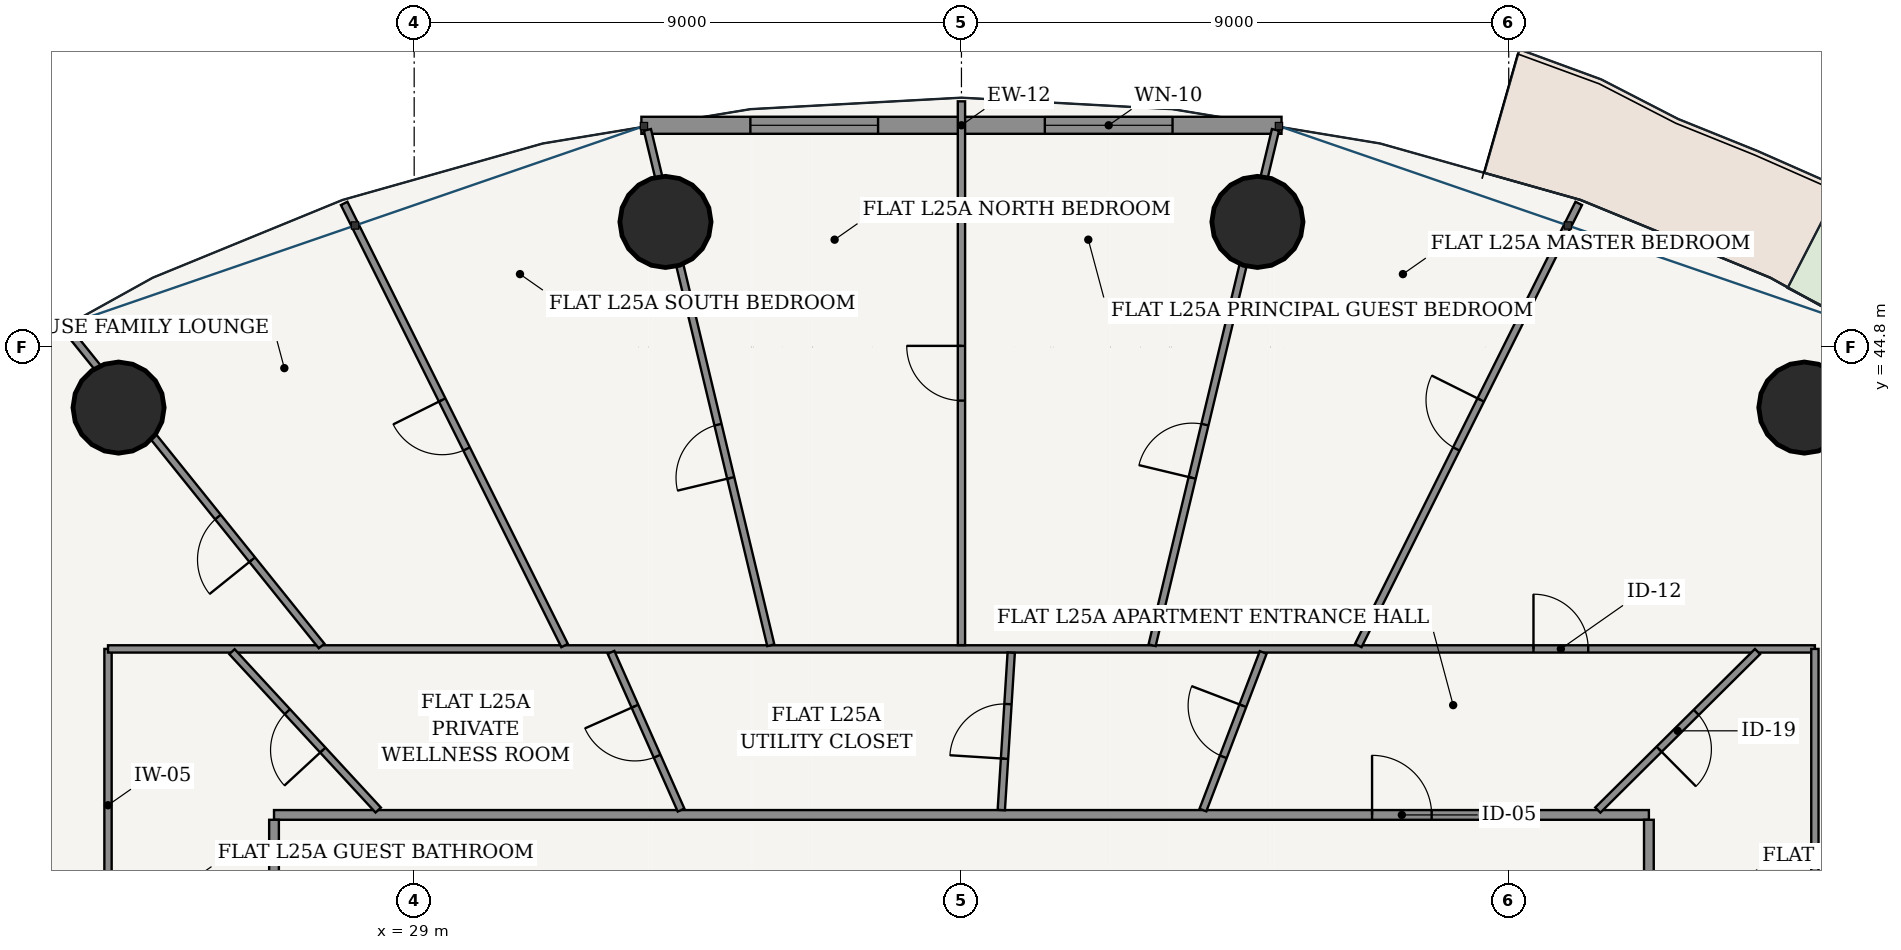
"""IFC4 building model, lengths in metres.
Left out: names, types, materials, properties, quantities, classifications, styles, units other than length and angle.
Written with IfcOpenShell. Run it as: python <this file> out.ifc"""

import sys

from ifc_helpers import new_model, si_unit, direction, frame, frame_2d, origin, origin_2d, place, context, subcontext, project, spatial, rectangle, hollow_circle, extrude, source, transform, mapped, element, fill, save


model = new_model("IFC4")
c1 = context("Model", 3, precision=1e-05, world=origin(), true_north=direction((-0.2419218956, 0.970295726276)))
c2 = subcontext(c1, "Body", "Model", "MODEL_VIEW")
j1 = project(units=[si_unit("LENGTHUNIT", "METRE"), si_unit("PLANEANGLEUNIT", "RADIAN")], contexts=[c1])
p1 = place(None, origin())
s1 = spatial("IfcSite", under=j1, at=p1, CompositionType="ELEMENT")
p2 = place(p1, origin())
s2 = spatial("IfcBuilding", under=s1, at=p2, CompositionType="ELEMENT")
p3 = place(p2, frame((0.0, 0.0, 97.8)))
s3 = spatial("IfcBuildingStorey", under=s2, at=p3, CompositionType="ELEMENT", Elevation=97.8)
for number, where, z_axis, x_axis in (
    (1, (51.862, 43.803, 0.0), (0.0, 0.0, 1.0), (1.0, 0.0, 0.0)),
    (2, (42.867, 46.857, 0.0), (0.0, 0.0, 1.0), (1.0, 0.0, 0.0)),
    (3, (33.133, 46.857, 0.0), (0.0, 0.0, 1.0), (1.0, 0.0, 0.0)),
    (4, (24.138, 43.803, 0.0), (0.0, 0.0, 1.0), (1.0, 0.0, 0.0)),
):
    element("IfcColumn", number, at=place(p3, frame(where, z_axis=z_axis, x_axis=x_axis)), inside=s3, PredefinedType="COLUMN", context=c2, shape_type="SweptSolid", body=[
        extrude(hollow_circle(Radius=0.75, WallThickness=0.045, at=origin_2d()), origin(), (0.0, 0.0, 1.0), 3.6),
    ])
p4 = place(p3, frame((43.264, 48.446, 0.0), z_axis=(0.0, 0.0, 1.0), x_axis=(-1.0, 0.0, 0.0)))
e5 = element("IfcWall", 5, at=p4, inside=s3, PredefinedType="SOLIDWALL", context=c2, shape_type="SweptSolid", body=[
    extrude(rectangle(XDim=10.527, YDim=0.28, at=frame_2d((5.264, 0.0))), origin(), (0.0, 0.0, 1.0), 3.325),
])
p5 = place(p4, frame((1.792, 0.0, 0.85)))
e6 = element("IfcOpeningElement", 6, at=p5, cuts=e5, PredefinedType="OPENING", context=c2, shape_type="SweptSolid", body=[
    extrude(rectangle(XDim=2.1, YDim=1.95, at=frame_2d((1.05, 0.975))), frame((0.0, 0.15, 0.0), z_axis=(0.0, -1.0, 0.0), x_axis=(1.0, 0.0, 0.0)), (0.0, 0.0, 1.0), 0.3),
])
p6 = place(p4, frame((6.635, 0.0, 0.85)))
e7 = element("IfcOpeningElement", 7, at=p6, cuts=e5, PredefinedType="OPENING", context=c2, shape_type="SweptSolid", body=[
    extrude(rectangle(XDim=2.1, YDim=1.95, at=frame_2d((1.05, 0.975))), frame((0.0, 0.15, 0.0), z_axis=(0.0, -1.0, 0.0), x_axis=(1.0, 0.0, 0.0)), (0.0, 0.0, 1.0), 0.3),
])
p7 = place(p3, frame((26.695, 37.105, 0.0), z_axis=(0.0, 0.0, 1.0), x_axis=(1.0, 0.0, 0.0)))
e8 = element("IfcWall", 8, at=p7, inside=s3, PredefinedType="PARTITIONING", context=c2, shape_type="SweptSolid", body=[
    extrude(rectangle(XDim=22.61, YDim=0.16, at=frame_2d((11.305, 0.0))), origin(), (0.0, 0.0, 1.0), 2.767),
])
p8 = place(p7, frame((18.058, 0.0, 0.0)))
e9 = element("IfcOpeningElement", 9, at=p8, cuts=e8, PredefinedType="OPENING", context=c2, shape_type="SweptSolid", body=[
    extrude(rectangle(XDim=0.98, YDim=2.2, at=frame_2d((0.49, 1.1))), frame((0.0, 0.09, 0.0), z_axis=(0.0, -1.0, 0.0), x_axis=(1.0, 0.0, 0.0)), (0.0, 0.0, 1.0), 0.18),
])
for number, where, z_axis, x_axis in (
    (10, (26.695, 16.575, 0.0), (0.0, 0.0, 1.0), (0.0, 1.0, 0.0)),
    (11, (49.305, 16.575, 0.0), (0.0, 0.0, 1.0), (0.0, 1.0, 0.0)),
):
    element("IfcWall", number, at=place(p3, frame(where, z_axis=z_axis, x_axis=x_axis)), inside=s3, PredefinedType="PARTITIONING", context=c2, shape_type="SweptSolid", body=[
        extrude(rectangle(XDim=20.45, YDim=0.16, at=frame_2d((10.225, 0.0))), origin(), (0.0, 0.0, 1.0), 2.767),
    ])
p9 = place(p3, frame((49.387, 33.121, 0.0), z_axis=(0.0, 0.0, 1.0), x_axis=(0.874320165728, 0.485349613992, 0.0)))
e12 = element("IfcWall", 12, at=p9, inside=s3, PredefinedType="PARTITIONING", context=c2, shape_type="SweptSolid", body=[
    extrude(rectangle(XDim=12.156, YDim=0.2, at=frame_2d((6.078, 0.0))), origin(), (0.0, 0.0, 1.0), 2.767),
])
p10 = place(p3, frame((23.965, 34.693, 0.0), z_axis=(0.0, 0.0, 1.0), x_axis=(0.0, 1.0, 0.0)))
e13 = element("IfcWall", 13, at=p10, inside=s3, PredefinedType="PARTITIONING", context=c2, shape_type="SweptSolid", body=[
    extrude(rectangle(XDim=5.142, YDim=0.12, at=frame_2d((2.571, 0.0))), origin(), (0.0, 0.0, 1.0), 3.004),
])
p11 = place(p3, frame((23.965, 39.835, 0.0), z_axis=(0.0, 0.0, 1.0), x_axis=(1.0, 0.0, 0.0)))
e14 = element("IfcWall", 14, at=p11, inside=s3, PredefinedType="PARTITIONING", context=c2, shape_type="SweptSolid", body=[
    extrude(rectangle(XDim=28.07, YDim=0.12, at=frame_2d((14.035, 0.0))), origin(), (0.0, 0.0, 1.0), 2.767),
])
p12 = place(p11, frame((23.442, 0.0, 0.0)))
e15 = element("IfcOpeningElement", 15, at=p12, cuts=e14, PredefinedType="OPENING", context=c2, shape_type="SweptSolid", body=[
    extrude(rectangle(XDim=0.9, YDim=2.15, at=frame_2d((0.45, 1.075))), frame((0.0, 0.07, 0.0), z_axis=(0.0, -1.0, 0.0), x_axis=(1.0, 0.0, 0.0)), (0.0, 0.0, 1.0), 0.14),
])
p13 = place(p3, frame((52.035, 39.835, 0.0), z_axis=(0.0, 0.0, 1.0), x_axis=(0.0, -1.0, 0.0)))
e16 = element("IfcWall", 16, at=p13, inside=s3, PredefinedType="PARTITIONING", context=c2, shape_type="SweptSolid", body=[
    extrude(rectangle(XDim=5.142, YDim=0.12, at=frame_2d((2.571, 0.0))), origin(), (0.0, 0.0, 1.0), 3.004),
])
p14 = place(p3, frame((44.526, 39.89, 0.0), z_axis=(0.0, 0.0, 1.0), x_axis=(0.446167584581, 0.894949432353, 0.0)))
e17 = element("IfcWall", 17, at=p14, inside=s3, PredefinedType="PARTITIONING", context=c2, shape_type="SweptSolid", body=[
    extrude(rectangle(XDim=8.125, YDim=0.12, at=frame_2d((4.062, 0.0))), origin(), (0.0, 0.0, 1.0), 2.767),
])
p15 = place(p14, frame((3.612, 0.0, 0.0)))
e18 = element("IfcOpeningElement", 18, at=p15, cuts=e17, PredefinedType="OPENING", context=c2, shape_type="SweptSolid", body=[
    extrude(rectangle(XDim=0.9, YDim=2.15, at=frame_2d((0.45, 1.075))), frame((0.0, 0.07, 0.0), z_axis=(0.0, -1.0, 0.0), x_axis=(1.0, 0.0, 0.0)), (0.0, 0.0, 1.0), 0.14),
])
p16 = place(p3, frame((41.135, 39.895, 0.0), z_axis=(0.0, 0.0, 1.0), x_axis=(0.23282725047, 0.97251810854, 0.0)))
e19 = element("IfcWall", 19, at=p16, inside=s3, PredefinedType="PARTITIONING", context=c2, shape_type="SweptSolid", body=[
    extrude(rectangle(XDim=8.715, YDim=0.12, at=frame_2d((4.357, 0.0))), origin(), (0.0, 0.0, 1.0), 2.767),
])
p17 = place(p16, frame((2.831, 0.0, 0.0)))
e20 = element("IfcOpeningElement", 20, at=p17, cuts=e19, PredefinedType="OPENING", context=c2, shape_type="SweptSolid", body=[
    extrude(rectangle(XDim=0.9, YDim=2.15, at=frame_2d((0.45, 1.075))), frame((0.0, 0.07, 0.0), z_axis=(0.0, -1.0, 0.0), x_axis=(1.0, 0.0, 0.0)), (0.0, 0.0, 1.0), 0.14),
])
p18 = place(p3, frame((38.0, 39.897, 0.0), z_axis=(0.0, 0.0, 1.0), x_axis=(0.0, 1.0, 0.0)))
e21 = element("IfcWall", 21, at=p18, inside=s3, PredefinedType="PARTITIONING", context=c2, shape_type="SweptSolid", body=[
    extrude(rectangle(XDim=8.943, YDim=0.12, at=frame_2d((4.472, 0.0))), origin(), (0.0, 0.0, 1.0), 2.767),
])
p19 = place(p18, frame((4.021, 0.0, 0.0)))
e22 = element("IfcOpeningElement", 22, at=p19, cuts=e21, PredefinedType="OPENING", context=c2, shape_type="SweptSolid", body=[
    extrude(rectangle(XDim=0.9, YDim=2.15, at=frame_2d((0.45, 1.075))), frame((0.0, 0.07, 0.0), z_axis=(0.0, -1.0, 0.0), x_axis=(1.0, 0.0, 0.0)), (0.0, 0.0, 1.0), 0.14),
])
p20 = place(p3, frame((34.865, 39.895, 0.0), z_axis=(0.0, 0.0, 1.0), x_axis=(-0.23282725047, 0.97251810854, 0.0)))
e23 = element("IfcWall", 23, at=p20, inside=s3, PredefinedType="PARTITIONING", context=c2, shape_type="SweptSolid", body=[
    extrude(rectangle(XDim=8.715, YDim=0.12, at=frame_2d((4.357, 0.0))), origin(), (0.0, 0.0, 1.0), 2.767),
])
p21 = place(p20, frame((2.83, 0.0, 0.0)))
e24 = element("IfcOpeningElement", 24, at=p21, cuts=e23, PredefinedType="OPENING", context=c2, shape_type="SweptSolid", body=[
    extrude(rectangle(XDim=0.9, YDim=2.15, at=frame_2d((0.45, 1.075))), frame((0.0, 0.07, 0.0), z_axis=(0.0, -1.0, 0.0), x_axis=(1.0, 0.0, 0.0)), (0.0, 0.0, 1.0), 0.14),
])
p22 = place(p3, frame((31.474, 39.89, 0.0), z_axis=(0.0, 0.0, 1.0), x_axis=(-0.446167584581, 0.894949432353, 0.0)))
e25 = element("IfcWall", 25, at=p22, inside=s3, PredefinedType="PARTITIONING", context=c2, shape_type="SweptSolid", body=[
    extrude(rectangle(XDim=8.125, YDim=0.12, at=frame_2d((4.062, 0.0))), origin(), (0.0, 0.0, 1.0), 2.767),
])
p23 = place(p22, frame((3.612, 0.0, 0.0)))
e26 = element("IfcOpeningElement", 26, at=p23, cuts=e25, PredefinedType="OPENING", context=c2, shape_type="SweptSolid", body=[
    extrude(rectangle(XDim=0.9, YDim=2.15, at=frame_2d((0.45, 1.075))), frame((0.0, 0.07, 0.0), z_axis=(0.0, -1.0, 0.0), x_axis=(1.0, 0.0, 0.0)), (0.0, 0.0, 1.0), 0.14),
])
p24 = place(p3, frame((27.478, 39.883, 0.0), z_axis=(0.0, 0.0, 1.0), x_axis=(-0.62672583251, 0.779239841682, 0.0)))
e27 = element("IfcWall", 27, at=p24, inside=s3, PredefinedType="PARTITIONING", context=c2, shape_type="SweptSolid", body=[
    extrude(rectangle(XDim=6.678, YDim=0.12, at=frame_2d((3.339, 0.0))), origin(), (0.0, 0.0, 1.0), 2.767),
])
p25 = place(p24, frame((1.821, 0.0, 0.0)))
e28 = element("IfcOpeningElement", 28, at=p25, cuts=e27, PredefinedType="OPENING", context=c2, shape_type="SweptSolid", body=[
    extrude(rectangle(XDim=0.9, YDim=2.15, at=frame_2d((0.45, 1.075))), frame((0.0, 0.07, 0.0), z_axis=(0.0, -1.0, 0.0), x_axis=(1.0, 0.0, 0.0)), (0.0, 0.0, 1.0), 0.14),
])
p26 = place(p3, frame((48.465, 37.185, 0.0), z_axis=(0.0, 0.0, 1.0), x_axis=(0.709839752998, 0.704363205359, 0.0)))
e29 = element("IfcWall", 29, at=p26, inside=s3, PredefinedType="PARTITIONING", context=c2, shape_type="SweptSolid", body=[
    extrude(rectangle(XDim=3.7, YDim=0.12, at=frame_2d((1.85, 0.0))), origin(), (0.0, 0.0, 1.0), 2.767),
])
p27 = place(p26, frame((1.42, 0.0, 0.0)))
e30 = element("IfcOpeningElement", 30, at=p27, cuts=e29, PredefinedType="OPENING", context=c2, shape_type="SweptSolid", body=[
    extrude(rectangle(XDim=0.86, YDim=2.15, at=frame_2d((0.43, 1.075))), frame((0.0, 0.07, 0.0), z_axis=(0.0, -1.0, 0.0), x_axis=(1.0, 0.0, 0.0)), (0.0, 0.0, 1.0), 0.14),
])
p28 = place(p3, frame((41.971, 37.185, 0.0), z_axis=(0.0, 0.0, 1.0), x_axis=(0.357180358075, 0.934035433913, 0.0)))
e31 = element("IfcWall", 31, at=p28, inside=s3, PredefinedType="PARTITIONING", context=c2, shape_type="SweptSolid", body=[
    extrude(rectangle(XDim=2.775, YDim=0.12, at=frame_2d((1.388, 0.0))), origin(), (0.0, 0.0, 1.0), 3.325),
])
p29 = place(p28, frame((0.938, 0.0, 0.0)))
e32 = element("IfcOpeningElement", 32, at=p29, cuts=e31, PredefinedType="OPENING", context=c2, shape_type="SweptSolid", body=[
    extrude(rectangle(XDim=0.9, YDim=2.15, at=frame_2d((0.45, 1.075))), frame((0.0, 0.07, 0.0), z_axis=(0.0, -1.0, 0.0), x_axis=(1.0, 0.0, 0.0)), (0.0, 0.0, 1.0), 0.14),
])
p30 = place(p3, frame((38.655, 37.185, 0.0), z_axis=(0.0, 0.0, 1.0), x_axis=(0.062981965009, 0.998014665265, 0.0)))
e33 = element("IfcWall", 33, at=p30, inside=s3, PredefinedType="PARTITIONING", context=c2, shape_type="SweptSolid", body=[
    extrude(rectangle(XDim=2.593, YDim=0.12, at=frame_2d((1.297, 0.0))), origin(), (0.0, 0.0, 1.0), 3.325),
])
p31 = place(p30, frame((0.847, 0.0, 0.0)))
e34 = element("IfcOpeningElement", 34, at=p31, cuts=e33, PredefinedType="OPENING", context=c2, shape_type="SweptSolid", body=[
    extrude(rectangle(XDim=0.9, YDim=2.15, at=frame_2d((0.45, 1.075))), frame((0.0, 0.07, 0.0), z_axis=(0.0, -1.0, 0.0), x_axis=(1.0, 0.0, 0.0)), (0.0, 0.0, 1.0), 0.14),
])
p32 = place(p3, frame((33.389, 37.185, 0.0), z_axis=(0.0, 0.0, 1.0), x_axis=(-0.40585903307, 0.913935689902, 0.0)))
e35 = element("IfcWall", 35, at=p32, inside=s3, PredefinedType="PARTITIONING", context=c2, shape_type="SweptSolid", body=[
    extrude(rectangle(XDim=2.837, YDim=0.12, at=frame_2d((1.419, 0.0))), origin(), (0.0, 0.0, 1.0), 3.325),
])
p33 = place(p32, frame((0.969, 0.0, 0.0)))
e36 = element("IfcOpeningElement", 36, at=p33, cuts=e35, PredefinedType="OPENING", context=c2, shape_type="SweptSolid", body=[
    extrude(rectangle(XDim=0.9, YDim=2.15, at=frame_2d((0.45, 1.075))), frame((0.0, 0.07, 0.0), z_axis=(0.0, -1.0, 0.0), x_axis=(1.0, 0.0, 0.0)), (0.0, 0.0, 1.0), 0.14),
])
p34 = place(p3, frame((28.409, 37.185, 0.0), z_axis=(0.0, 0.0, 1.0), x_axis=(-0.678451695105, 0.734645014554, 0.0)))
e37 = element("IfcWall", 37, at=p34, inside=s3, PredefinedType="PARTITIONING", context=c2, shape_type="SweptSolid", body=[
    extrude(rectangle(XDim=3.545, YDim=0.12, at=frame_2d((1.772, 0.0))), origin(), (0.0, 0.0, 1.0), 2.767),
])
p35 = place(p34, frame((1.343, 0.0, 0.0)))
e38 = element("IfcOpeningElement", 38, at=p35, cuts=e37, PredefinedType="OPENING", context=c2, shape_type="SweptSolid", body=[
    extrude(rectangle(XDim=0.86, YDim=2.15, at=frame_2d((0.43, 1.075))), frame((0.0, 0.07, 0.0), z_axis=(0.0, -1.0, 0.0), x_axis=(1.0, 0.0, 0.0)), (0.0, 0.0, 1.0), 0.14),
])
p36 = place(p3, frame((26.615, 33.12, 0.0), z_axis=(0.0, 0.0, 1.0), x_axis=(-0.874319192772, 0.485351366692, 0.0)))
e39 = element("IfcWall", 39, at=p36, inside=s3, PredefinedType="PARTITIONING", context=c2, shape_type="SweptSolid", body=[
    extrude(rectangle(XDim=12.158, YDim=0.2, at=frame_2d((6.079, 0.0))), origin(), (0.0, 0.0, 1.0), 2.767),
])
m1 = source(origin(), c2, "Body", "SweptSolid", [
    extrude(rectangle(XDim=2.1, YDim=1.95, at=frame_2d((1.05, 0.975))), frame((0.0, 0.03, 0.0), z_axis=(0.0, -1.0, 0.0), x_axis=(1.0, 0.0, 0.0)), (0.0, 0.0, 1.0), 0.06),
])
p37 = place(p5, origin())
e40 = element("IfcWindow", 40, at=p37, inside=s3, PartitioningType="SINGLE_PANEL", PredefinedType="WINDOW", context=c2, shape_type="MappedRepresentation", body=[
    mapped(m1, transform((0.0, 0.0, 0.0), scale=1.0)),
])
fill(e6, e40)
p38 = place(p6, origin())
e41 = element("IfcWindow", 41, at=p38, inside=s3, PartitioningType="SINGLE_PANEL", PredefinedType="WINDOW", context=c2, shape_type="MappedRepresentation", body=[
    mapped(m1, transform((0.0, 0.0, 0.0), scale=1.0)),
])
fill(e7, e41)
m2 = source(origin(), c2, "Body", "SweptSolid", [
    extrude(rectangle(XDim=0.98, YDim=2.2, at=frame_2d((0.49, 1.1))), frame((0.0, 0.025, 0.0), z_axis=(0.0, -1.0, 0.0), x_axis=(1.0, 0.0, 0.0)), (0.0, 0.0, 1.0), 0.05),
])
p39 = place(p8, origin())
e42 = element("IfcDoor", 42, at=p39, inside=s3, OperationType="SINGLE_SWING_LEFT", PredefinedType="DOOR", context=c2, shape_type="MappedRepresentation", body=[
    mapped(m2, transform((0.0, 0.0, 0.0), scale=1.0)),
])
fill(e9, e42)
m3 = source(origin(), c2, "Body", "SweptSolid", [
    extrude(rectangle(XDim=0.86, YDim=2.15, at=frame_2d((0.43, 1.075))), frame((0.0, 0.025, 0.0), z_axis=(0.0, -1.0, 0.0), x_axis=(1.0, 0.0, 0.0)), (0.0, 0.0, 1.0), 0.05),
])
p40 = place(p27, frame((0.86, 0.0, 0.0), z_axis=(0.0, 0.0, 1.0), x_axis=(-1.0, 0.0, 0.0)))
e43 = element("IfcDoor", 43, at=p40, inside=s3, OperationType="SINGLE_SWING_RIGHT", PredefinedType="DOOR", context=c2, shape_type="MappedRepresentation", body=[
    mapped(m3, transform((0.0, 0.0, 0.0), scale=1.0)),
])
fill(e30, e43)
m4 = source(origin(), c2, "Body", "SweptSolid", [
    extrude(rectangle(XDim=0.9, YDim=2.15, at=frame_2d((0.45, 1.075))), frame((0.0, 0.025, 0.0), z_axis=(0.0, -1.0, 0.0), x_axis=(1.0, 0.0, 0.0)), (0.0, 0.0, 1.0), 0.05),
])
p41 = place(p12, origin())
e44 = element("IfcDoor", 44, at=p41, inside=s3, OperationType="SINGLE_SWING_LEFT", PredefinedType="DOOR", context=c2, shape_type="MappedRepresentation", body=[
    mapped(m4, transform((0.0, 0.0, 0.0), scale=1.0)),
])
fill(e15, e44)
p42 = place(p29, origin())
e45 = element("IfcDoor", 45, at=p42, inside=s3, OperationType="SINGLE_SWING_RIGHT", PredefinedType="DOOR", context=c2, shape_type="MappedRepresentation", body=[
    mapped(m4, transform((0.0, 0.0, 0.0), scale=1.0)),
])
fill(e32, e45)
p43 = place(p31, origin())
e46 = element("IfcDoor", 46, at=p43, inside=s3, OperationType="SINGLE_SWING_LEFT", PredefinedType="DOOR", context=c2, shape_type="MappedRepresentation", body=[
    mapped(m4, transform((0.0, 0.0, 0.0), scale=1.0)),
])
fill(e34, e46)
p44 = place(p33, origin())
e47 = element("IfcDoor", 47, at=p44, inside=s3, OperationType="SINGLE_SWING_RIGHT", PredefinedType="DOOR", context=c2, shape_type="MappedRepresentation", body=[
    mapped(m4, transform((0.0, 0.0, 0.0), scale=1.0)),
])
fill(e36, e47)
p45 = place(p35, origin())
e48 = element("IfcDoor", 48, at=p45, inside=s3, OperationType="SINGLE_SWING_LEFT", PredefinedType="DOOR", context=c2, shape_type="MappedRepresentation", body=[
    mapped(m3, transform((0.0, 0.0, 0.0), scale=1.0)),
])
fill(e38, e48)
p46 = place(p15, origin())
e49 = element("IfcDoor", 49, at=p46, inside=s3, OperationType="SINGLE_SWING_RIGHT", PredefinedType="DOOR", context=c2, shape_type="MappedRepresentation", body=[
    mapped(m4, transform((0.0, 0.0, 0.0), scale=1.0)),
])
fill(e18, e49)
p47 = place(p17, origin())
e50 = element("IfcDoor", 50, at=p47, inside=s3, OperationType="SINGLE_SWING_LEFT", PredefinedType="DOOR", context=c2, shape_type="MappedRepresentation", body=[
    mapped(m4, transform((0.0, 0.0, 0.0), scale=1.0)),
])
fill(e20, e50)
p48 = place(p19, origin())
e51 = element("IfcDoor", 51, at=p48, inside=s3, OperationType="SINGLE_SWING_RIGHT", PredefinedType="DOOR", context=c2, shape_type="MappedRepresentation", body=[
    mapped(m4, transform((0.0, 0.0, 0.0), scale=1.0)),
])
fill(e22, e51)
p49 = place(p21, origin())
e52 = element("IfcDoor", 52, at=p49, inside=s3, OperationType="SINGLE_SWING_LEFT", PredefinedType="DOOR", context=c2, shape_type="MappedRepresentation", body=[
    mapped(m4, transform((0.0, 0.0, 0.0), scale=1.0)),
])
fill(e24, e52)
p50 = place(p23, origin())
e53 = element("IfcDoor", 53, at=p50, inside=s3, OperationType="SINGLE_SWING_RIGHT", PredefinedType="DOOR", context=c2, shape_type="MappedRepresentation", body=[
    mapped(m4, transform((0.0, 0.0, 0.0), scale=1.0)),
])
fill(e26, e53)
p51 = place(p25, origin())
e54 = element("IfcDoor", 54, at=p51, inside=s3, OperationType="SINGLE_SWING_LEFT", PredefinedType="DOOR", context=c2, shape_type="MappedRepresentation", body=[
    mapped(m4, transform((0.0, 0.0, 0.0), scale=1.0)),
])
fill(e28, e54)
save(model, sys.argv[1])
